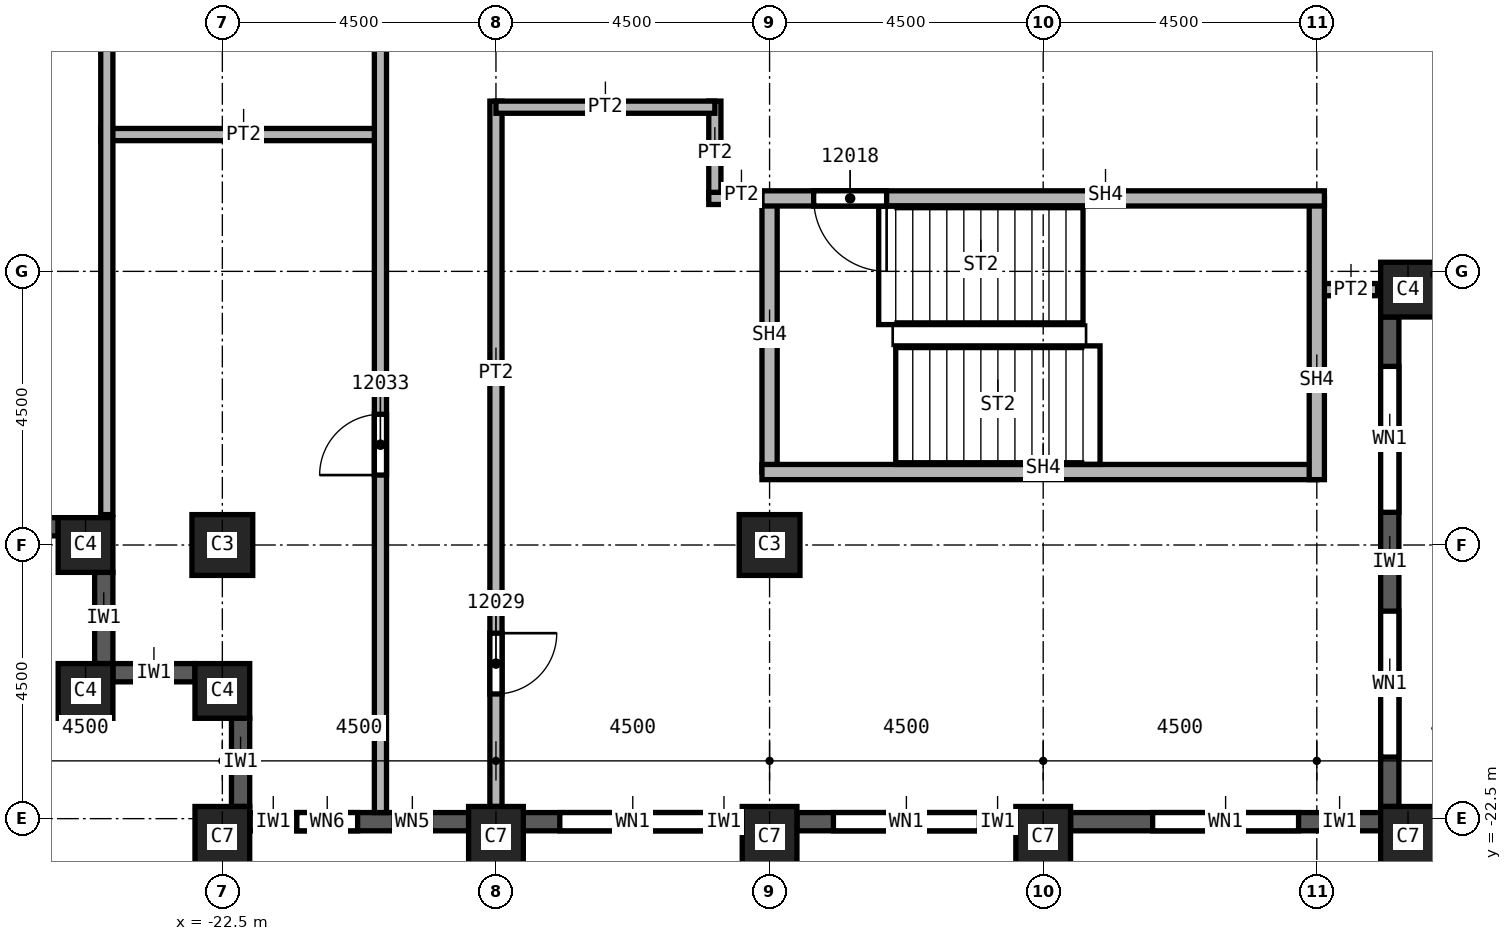
"""IFC4 building model, lengths in metres.
Left out: names, types, materials, properties, quantities, classifications, styles, units other than length and angle.
Written with IfcOpenShell. Run it as: python <this file> out.ifc"""

import sys

from ifc_helpers import new_model, si_unit, direction, frame, frame_2d, origin, origin_2d, place, context, subcontext, project, spatial, rectangle, extrude, element, fill, save


model = new_model("IFC4")
c1 = context("Model", 3, precision=1e-05, world=origin(), true_north=direction((0.0, 1.0)))
c2 = subcontext(c1, "Body", "Model", "MODEL_VIEW")
j1 = project(units=[si_unit("LENGTHUNIT", "METRE"), si_unit("PLANEANGLEUNIT", "RADIAN")], contexts=[c1])
p1 = place(None, origin())
s1 = spatial("IfcSite", under=j1, at=p1, CompositionType="ELEMENT")
p2 = place(p1, origin())
s2 = spatial("IfcBuilding", under=s1, at=p2, CompositionType="ELEMENT")
p3 = place(p2, frame((0.0, 0.0, 196.0)))
s3 = spatial("IfcBuildingStorey", under=s2, at=p3, CompositionType="ELEMENT", Elevation=196.0)
for number, where, z_axis, x_axis in (
    (1, (-13.5, -18.0, 0.0), (0.0, 0.0, 1.0), (1.0, 0.0, 0.0)),
    (2, (-22.5, -18.0, 0.0), (0.0, 0.0, 1.0), (1.0, 0.0, 0.0)),
):
    element("IfcColumn", number, at=place(p3, frame(where, z_axis=z_axis, x_axis=x_axis)), inside=s3, PredefinedType="COLUMN", context=c2, shape_type="SweptSolid", body=[
        extrude(rectangle(XDim=1.0, YDim=1.0, at=origin_2d()), origin(), (0.0, 0.0, 1.0), 3.72),
    ])
for number, where, z_axis, x_axis in (
    (3, (-3.0, -22.8, 0.0), (0.0, 0.0, 1.0), (1.0, 0.0, 0.0)),
    (4, (-9.0, -22.8, 0.0), (0.0, 0.0, 1.0), (1.0, 0.0, 0.0)),
    (5, (-13.5, -22.8, 0.0), (0.0, 0.0, 1.0), (1.0, 0.0, 0.0)),
    (6, (-18.0, -22.8, 0.0), (0.0, 0.0, 1.0), (1.0, 0.0, 0.0)),
    (7, (-22.5, -22.8, 0.0), (0.0, 0.0, 1.0), (1.0, 0.0, 0.0)),
):
    element("IfcColumn", number, at=place(p3, frame(where, z_axis=z_axis, x_axis=x_axis)), inside=s3, PredefinedType="COLUMN", context=c2, shape_type="SweptSolid", body=[
        extrude(rectangle(XDim=0.9, YDim=1.0, at=origin_2d()), origin(), (0.0, 0.0, 1.0), 3.72),
    ])
for number, where, z_axis, x_axis in (
    (8, (-3.0, -13.8, 0.0), (0.0, 0.0, 1.0), (1.0, 0.0, 0.0)),
    (9, (-22.5, -20.4, 0.0), (0.0, 0.0, 1.0), (1.0, 0.0, 0.0)),
    (10, (-24.75, -20.4, 0.0), (0.0, 0.0, 1.0), (1.0, 0.0, 0.0)),
    (11, (-24.75, -18.0, 0.0), (0.0, 0.0, 1.0), (1.0, 0.0, 0.0)),
):
    element("IfcColumn", number, at=place(p3, frame(where, z_axis=z_axis, x_axis=x_axis)), inside=s3, PredefinedType="COLUMN", context=c2, shape_type="SweptSolid", body=[
        extrude(rectangle(XDim=0.9, YDim=0.9, at=origin_2d()), origin(), (0.0, 0.0, 1.0), 3.72),
    ])
p4 = place(p3, frame((-26.55, -17.7, 0.0), z_axis=(0.0, 0.0, 1.0), x_axis=(1.0, 0.0, 0.0)))
e12 = element("IfcWall", 12, at=p4, inside=s3, PredefinedType="SOLIDWALL", context=c2, shape_type="SweptSolid", body=[
    extrude(rectangle(XDim=1.35, YDim=0.3, at=frame_2d((0.675, 0.0))), origin(), (0.0, 0.0, 1.0), 3.12),
])
p5 = place(p3, frame((-24.45, -18.45, 0.0), z_axis=(0.0, 0.0, 1.0), x_axis=(0.0, -1.0, 0.0)))
e13 = element("IfcWall", 13, at=p5, inside=s3, PredefinedType="SOLIDWALL", context=c2, shape_type="SweptSolid", body=[
    extrude(rectangle(XDim=1.5, YDim=0.3, at=frame_2d((0.75, 0.0))), origin(), (0.0, 0.0, 1.0), 3.12),
])
p6 = place(p3, frame((-24.3, -20.1, 0.0), z_axis=(0.0, 0.0, 1.0), x_axis=(1.0, 0.0, 0.0)))
e14 = element("IfcWall", 14, at=p6, inside=s3, PredefinedType="SOLIDWALL", context=c2, shape_type="SweptSolid", body=[
    extrude(rectangle(XDim=1.35, YDim=0.3, at=frame_2d((0.675, 0.0))), origin(), (0.0, 0.0, 1.0), 3.12),
])
p7 = place(p3, frame((-22.2, -20.85, 0.0), z_axis=(0.0, 0.0, 1.0), x_axis=(0.0, -1.0, 0.0)))
e15 = element("IfcWall", 15, at=p7, inside=s3, PredefinedType="SOLIDWALL", context=c2, shape_type="SweptSolid", body=[
    extrude(rectangle(XDim=1.45, YDim=0.3, at=frame_2d((0.725, 0.0))), origin(), (0.0, 0.0, 1.0), 3.12),
])
p8 = place(p3, frame((-22.05, -22.55, 0.0), z_axis=(0.0, 0.0, 1.0), x_axis=(1.0, 0.0, 0.0)))
e16 = element("IfcWall", 16, at=p8, inside=s3, PredefinedType="SOLIDWALL", context=c2, shape_type="SweptSolid", body=[
    extrude(rectangle(XDim=3.6, YDim=0.3, at=frame_2d((1.8, 0.0))), origin(), (0.0, 0.0, 1.0), 3.12),
])
p9 = place(p8, frame((0.775, 0.0, 0.8)))
e17 = element("IfcOpeningElement", 17, at=p9, cuts=e16, PredefinedType="OPENING", context=c2, shape_type="SweptSolid", body=[
    extrude(rectangle(XDim=1.0, YDim=1.95, at=frame_2d((0.5, 0.975))), frame((0.0, 0.15, 0.0), z_axis=(0.0, -1.0, 0.0), x_axis=(1.0, 0.0, 0.0)), (0.0, 0.0, 1.0), 0.3),
])
p10 = place(p8, frame((2.375, 0.0, 0.8)))
e18 = element("IfcOpeningElement", 18, at=p10, cuts=e16, PredefinedType="OPENING", context=c2, shape_type="SweptSolid", body=[
    extrude(rectangle(XDim=0.6, YDim=1.95, at=frame_2d((0.3, 0.975))), frame((0.0, 0.15, 0.0), z_axis=(0.0, -1.0, 0.0), x_axis=(1.0, 0.0, 0.0)), (0.0, 0.0, 1.0), 0.3),
])
p11 = place(p3, frame((-17.55, -22.55, 0.0), z_axis=(0.0, 0.0, 1.0), x_axis=(1.0, 0.0, 0.0)))
e19 = element("IfcWall", 19, at=p11, inside=s3, PredefinedType="SOLIDWALL", context=c2, shape_type="SweptSolid", body=[
    extrude(rectangle(XDim=3.6, YDim=0.3, at=frame_2d((1.8, 0.0))), origin(), (0.0, 0.0, 1.0), 3.12),
])
p12 = place(p11, frame((0.6, 0.0, 0.8)))
e20 = element("IfcOpeningElement", 20, at=p12, cuts=e19, PredefinedType="OPENING", context=c2, shape_type="SweptSolid", body=[
    extrude(rectangle(XDim=2.4, YDim=1.95, at=frame_2d((1.2, 0.975))), frame((0.0, 0.15, 0.0), z_axis=(0.0, -1.0, 0.0), x_axis=(1.0, 0.0, 0.0)), (0.0, 0.0, 1.0), 0.3),
])
p13 = place(p3, frame((-13.05, -22.55, 0.0), z_axis=(0.0, 0.0, 1.0), x_axis=(1.0, 0.0, 0.0)))
e21 = element("IfcWall", 21, at=p13, inside=s3, PredefinedType="SOLIDWALL", context=c2, shape_type="SweptSolid", body=[
    extrude(rectangle(XDim=3.6, YDim=0.3, at=frame_2d((1.8, 0.0))), origin(), (0.0, 0.0, 1.0), 3.12),
])
p14 = place(p13, frame((0.6, 0.0, 0.8)))
e22 = element("IfcOpeningElement", 22, at=p14, cuts=e21, PredefinedType="OPENING", context=c2, shape_type="SweptSolid", body=[
    extrude(rectangle(XDim=2.4, YDim=1.95, at=frame_2d((1.2, 0.975))), frame((0.0, 0.15, 0.0), z_axis=(0.0, -1.0, 0.0), x_axis=(1.0, 0.0, 0.0)), (0.0, 0.0, 1.0), 0.3),
])
p15 = place(p3, frame((-8.55, -22.55, 0.0), z_axis=(0.0, 0.0, 1.0), x_axis=(1.0, 0.0, 0.0)))
e23 = element("IfcWall", 23, at=p15, inside=s3, PredefinedType="SOLIDWALL", context=c2, shape_type="SweptSolid", body=[
    extrude(rectangle(XDim=5.1, YDim=0.3, at=frame_2d((2.55, 0.0))), origin(), (0.0, 0.0, 1.0), 3.12),
])
p16 = place(p15, frame((1.35, 0.0, 0.8)))
e24 = element("IfcOpeningElement", 24, at=p16, cuts=e23, PredefinedType="OPENING", context=c2, shape_type="SweptSolid", body=[
    extrude(rectangle(XDim=2.4, YDim=1.95, at=frame_2d((1.2, 0.975))), frame((0.0, 0.15, 0.0), z_axis=(0.0, -1.0, 0.0), x_axis=(1.0, 0.0, 0.0)), (0.0, 0.0, 1.0), 0.3),
])
p17 = place(p3, frame((-3.3, -22.3, 0.0), z_axis=(0.0, 0.0, 1.0), x_axis=(0.0, 1.0, 0.0)))
e25 = element("IfcWall", 25, at=p17, inside=s3, PredefinedType="SOLIDWALL", context=c2, shape_type="SweptSolid", body=[
    extrude(rectangle(XDim=8.05, YDim=0.3, at=frame_2d((4.025, 0.0))), origin(), (0.0, 0.0, 1.0), 3.12),
])
p18 = place(p17, frame((0.812, 0.0, 0.8)))
e26 = element("IfcOpeningElement", 26, at=p18, cuts=e25, PredefinedType="OPENING", context=c2, shape_type="SweptSolid", body=[
    extrude(rectangle(XDim=2.4, YDim=1.95, at=frame_2d((1.2, 0.975))), frame((0.0, 0.15, 0.0), z_axis=(0.0, -1.0, 0.0), x_axis=(1.0, 0.0, 0.0)), (0.0, 0.0, 1.0), 0.3),
])
p19 = place(p17, frame((4.837, 0.0, 0.8)))
e27 = element("IfcOpeningElement", 27, at=p19, cuts=e25, PredefinedType="OPENING", context=c2, shape_type="SweptSolid", body=[
    extrude(rectangle(XDim=2.4, YDim=1.95, at=frame_2d((1.2, 0.975))), frame((0.0, 0.15, 0.0), z_axis=(0.0, -1.0, 0.0), x_axis=(1.0, 0.0, 0.0)), (0.0, 0.0, 1.0), 0.3),
])
p20 = place(p3, frame((-24.5, -11.25, 0.0), z_axis=(0.0, 0.0, 1.0), x_axis=(1.0, 0.0, 0.0)))
e28 = element("IfcWall", 28, at=p20, inside=s3, PredefinedType="PARTITIONING", context=c2, shape_type="SweptSolid", body=[
    extrude(rectangle(XDim=4.6, YDim=0.2, at=frame_2d((2.3, 0.0))), origin(), (0.0, 0.0, 1.0), 3.72),
])
p21 = place(p3, frame((-24.4, -17.5, 0.0), z_axis=(0.0, 0.0, 1.0), x_axis=(0.0, 1.0, 0.0)))
e29 = element("IfcWall", 29, at=p21, inside=s3, PredefinedType="PARTITIONING", context=c2, shape_type="SweptSolid", body=[
    extrude(rectangle(XDim=18.25, YDim=0.2, at=frame_2d((9.125, 0.0))), origin(), (0.0, 0.0, 1.0), 3.72),
])
p22 = place(p21, frame((14.45, 0.0, 0.0)))
e30 = element("IfcOpeningElement", 30, at=p22, cuts=e29, PredefinedType="OPENING", context=c2, shape_type="SweptSolid", body=[
    extrude(rectangle(XDim=1.0, YDim=2.1, at=frame_2d((0.5, 1.05))), frame((0.0, 0.1, 0.0), z_axis=(0.0, -1.0, 0.0), x_axis=(1.0, 0.0, 0.0)), (0.0, 0.0, 1.0), 0.2),
])
p23 = place(p3, frame((-19.9, -22.4, 0.0), z_axis=(0.0, 0.0, 1.0), x_axis=(0.0, 1.0, 0.0)))
e31 = element("IfcWall", 31, at=p23, inside=s3, PredefinedType="PARTITIONING", context=c2, shape_type="SweptSolid", body=[
    extrude(rectangle(XDim=23.25, YDim=0.2, at=frame_2d((11.625, 0.0))), origin(), (0.0, 0.0, 1.0), 3.72),
])
p24 = place(p23, frame((5.55, 0.0, 0.0)))
e32 = element("IfcOpeningElement", 32, at=p24, cuts=e31, PredefinedType="OPENING", context=c2, shape_type="SweptSolid", body=[
    extrude(rectangle(XDim=1.0, YDim=2.1, at=frame_2d((0.5, 1.05))), frame((0.0, 0.1, 0.0), z_axis=(0.0, -1.0, 0.0), x_axis=(1.0, 0.0, 0.0)), (0.0, 0.0, 1.0), 0.2),
])
p25 = place(p23, frame((14.0, 0.0, 0.0)))
e33 = element("IfcOpeningElement", 33, at=p25, cuts=e31, PredefinedType="OPENING", context=c2, shape_type="SweptSolid", body=[
    extrude(rectangle(XDim=1.0, YDim=2.1, at=frame_2d((0.5, 1.05))), frame((0.0, 0.1, 0.0), z_axis=(0.0, -1.0, 0.0), x_axis=(1.0, 0.0, 0.0)), (0.0, 0.0, 1.0), 0.2),
])
p26 = place(p3, frame((-18.0, -10.7, 0.0), z_axis=(0.0, 0.0, 1.0), x_axis=(0.0, -1.0, 0.0)))
e34 = element("IfcWall", 34, at=p26, inside=s3, PredefinedType="PARTITIONING", context=c2, shape_type="SweptSolid", body=[
    extrude(rectangle(XDim=11.6, YDim=0.2, at=frame_2d((5.8, 0.0))), origin(), (0.0, 0.0, 1.0), 3.72),
])
p27 = place(p26, frame((8.75, 0.0, 0.0)))
e35 = element("IfcOpeningElement", 35, at=p27, cuts=e34, PredefinedType="OPENING", context=c2, shape_type="SweptSolid", body=[
    extrude(rectangle(XDim=1.0, YDim=2.1, at=frame_2d((0.5, 1.05))), frame((0.0, 0.1, 0.0), z_axis=(0.0, -1.0, 0.0), x_axis=(1.0, 0.0, 0.0)), (0.0, 0.0, 1.0), 0.2),
])
p28 = place(p3, frame((-14.4, -12.3, 0.0), z_axis=(0.0, 0.0, 1.0), x_axis=(0.0, 1.0, 0.0)))
e36 = element("IfcWall", 36, at=p28, inside=s3, PredefinedType="PARTITIONING", context=c2, shape_type="SweptSolid", body=[
    extrude(rectangle(XDim=1.6, YDim=0.2, at=frame_2d((0.8, 0.0))), origin(), (0.0, 0.0, 1.0), 3.72),
])
p29 = place(p3, frame((-14.4, -10.8, 0.0), z_axis=(0.0, 0.0, 1.0), x_axis=(-1.0, 0.0, 0.0)))
e37 = element("IfcWall", 37, at=p29, inside=s3, PredefinedType="PARTITIONING", context=c2, shape_type="SweptSolid", body=[
    extrude(rectangle(XDim=3.6, YDim=0.2, at=frame_2d((1.8, 0.0))), origin(), (0.0, 0.0, 1.0), 3.72),
])
p30 = place(p3, frame((-13.375, -12.3, 0.0), z_axis=(0.0, 0.0, 1.0), x_axis=(-1.0, 0.0, 0.0)))
e38 = element("IfcWall", 38, at=p30, inside=s3, PredefinedType="PARTITIONING", context=c2, shape_type="SweptSolid", body=[
    extrude(rectangle(XDim=1.125, YDim=0.2, at=frame_2d((0.562, 0.0))), origin(), (0.0, 0.0, 1.0), 3.72),
])
p31 = place(p3, frame((-3.5, -13.8, 0.0), z_axis=(0.0, 0.0, 1.0), x_axis=(-1.0, 0.0, 0.0)))
e39 = element("IfcWall", 39, at=p31, inside=s3, PredefinedType="PARTITIONING", context=c2, shape_type="SweptSolid", body=[
    extrude(rectangle(XDim=1.0, YDim=0.2, at=frame_2d((0.5, 0.0))), origin(), (0.0, 0.0, 1.0), 3.72),
])
p32 = place(p3, frame((-13.5, -16.8, 0.0), z_axis=(0.0, 0.0, 1.0), x_axis=(0.0, 1.0, 0.0)))
e40 = element("IfcWall", 40, at=p32, inside=s3, PredefinedType="SOLIDWALL", context=c2, shape_type="SweptSolid", body=[
    extrude(rectangle(XDim=4.5, YDim=0.25, at=frame_2d((2.25, 0.0))), origin(), (0.0, 0.0, 1.0), 3.72),
])
p33 = place(p3, frame((-4.5, -16.8, 0.0), z_axis=(0.0, 0.0, 1.0), x_axis=(-1.0, 0.0, 0.0)))
e41 = element("IfcWall", 41, at=p33, inside=s3, PredefinedType="SOLIDWALL", context=c2, shape_type="SweptSolid", body=[
    extrude(rectangle(XDim=9.125, YDim=0.25, at=frame_2d((4.562, 0.0))), origin(), (0.0, 0.0, 1.0), 3.72),
])
p34 = place(p3, frame((-4.5, -12.3, 0.0), z_axis=(0.0, 0.0, 1.0), x_axis=(0.0, -1.0, 0.0)))
e42 = element("IfcWall", 42, at=p34, inside=s3, PredefinedType="SOLIDWALL", context=c2, shape_type="SweptSolid", body=[
    extrude(rectangle(XDim=4.625, YDim=0.25, at=frame_2d((2.312, 0.0))), origin(), (0.0, 0.0, 1.0), 3.72),
])
p35 = place(p3, frame((-4.375, -12.3, 0.0), z_axis=(0.0, 0.0, 1.0), x_axis=(-1.0, 0.0, 0.0)))
e43 = element("IfcWall", 43, at=p35, inside=s3, PredefinedType="SOLIDWALL", context=c2, shape_type="SweptSolid", body=[
    extrude(rectangle(XDim=9.25, YDim=0.25, at=frame_2d((4.625, 0.0))), origin(), (0.0, 0.0, 1.0), 3.72),
])
p36 = place(p35, frame((7.2, 0.0, 0.0)))
e44 = element("IfcOpeningElement", 44, at=p36, cuts=e43, PredefinedType="OPENING", context=c2, shape_type="SweptSolid", body=[
    extrude(rectangle(XDim=1.2, YDim=2.1, at=frame_2d((0.6, 1.05))), frame((0.0, 0.125, 0.0), z_axis=(0.0, -1.0, 0.0), x_axis=(1.0, 0.0, 0.0)), (0.0, 0.0, 1.0), 0.25),
])
p37 = place(p12, origin())
e45 = element("IfcWindow", 45, at=p37, inside=s3, PartitioningType="SINGLE_PANEL", PredefinedType="WINDOW", context=c2, shape_type="SweptSolid", body=[
    extrude(rectangle(XDim=2.4, YDim=1.95, at=frame_2d((1.2, 0.975))), frame((0.0, 0.03, 0.0), z_axis=(0.0, -1.0, 0.0), x_axis=(1.0, 0.0, 0.0)), (0.0, 0.0, 1.0), 0.06),
])
fill(e20, e45)
p38 = place(p14, origin())
e46 = element("IfcWindow", 46, at=p38, inside=s3, PartitioningType="SINGLE_PANEL", PredefinedType="WINDOW", context=c2, shape_type="SweptSolid", body=[
    extrude(rectangle(XDim=2.4, YDim=1.95, at=frame_2d((1.2, 0.975))), frame((0.0, 0.03, 0.0), z_axis=(0.0, -1.0, 0.0), x_axis=(1.0, 0.0, 0.0)), (0.0, 0.0, 1.0), 0.06),
])
fill(e22, e46)
p39 = place(p16, origin())
e47 = element("IfcWindow", 47, at=p39, inside=s3, PartitioningType="SINGLE_PANEL", PredefinedType="WINDOW", context=c2, shape_type="SweptSolid", body=[
    extrude(rectangle(XDim=2.4, YDim=1.95, at=frame_2d((1.2, 0.975))), frame((0.0, 0.03, 0.0), z_axis=(0.0, -1.0, 0.0), x_axis=(1.0, 0.0, 0.0)), (0.0, 0.0, 1.0), 0.06),
])
fill(e24, e47)
p40 = place(p18, origin())
e48 = element("IfcWindow", 48, at=p40, inside=s3, PartitioningType="SINGLE_PANEL", PredefinedType="WINDOW", context=c2, shape_type="SweptSolid", body=[
    extrude(rectangle(XDim=2.4, YDim=1.95, at=frame_2d((1.2, 0.975))), frame((0.0, 0.03, 0.0), z_axis=(0.0, -1.0, 0.0), x_axis=(1.0, 0.0, 0.0)), (0.0, 0.0, 1.0), 0.06),
])
fill(e26, e48)
p41 = place(p19, origin())
e49 = element("IfcWindow", 49, at=p41, inside=s3, PartitioningType="SINGLE_PANEL", PredefinedType="WINDOW", context=c2, shape_type="SweptSolid", body=[
    extrude(rectangle(XDim=2.4, YDim=1.95, at=frame_2d((1.2, 0.975))), frame((0.0, 0.03, 0.0), z_axis=(0.0, -1.0, 0.0), x_axis=(1.0, 0.0, 0.0)), (0.0, 0.0, 1.0), 0.06),
])
fill(e27, e49)
p42 = place(p36, origin())
e50 = element("IfcDoor", 50, at=p42, inside=s3, OperationType="SINGLE_SWING_LEFT", PredefinedType="DOOR", context=c2, shape_type="SweptSolid", body=[
    extrude(rectangle(XDim=1.2, YDim=2.1, at=frame_2d((0.6, 1.05))), frame((0.0, 0.025, 0.0), z_axis=(0.0, -1.0, 0.0), x_axis=(1.0, 0.0, 0.0)), (0.0, 0.0, 1.0), 0.05),
])
fill(e44, e50)
p43 = place(p27, origin())
e51 = element("IfcDoor", 51, at=p43, inside=s3, OperationType="SINGLE_SWING_RIGHT", PredefinedType="DOOR", context=c2, shape_type="SweptSolid", body=[
    extrude(rectangle(XDim=1.0, YDim=2.1, at=frame_2d((0.5, 1.05))), frame((0.0, 0.025, 0.0), z_axis=(0.0, -1.0, 0.0), x_axis=(1.0, 0.0, 0.0)), (0.0, 0.0, 1.0), 0.05),
])
fill(e35, e51)
p44 = place(p24, origin())
e52 = element("IfcDoor", 52, at=p44, inside=s3, OperationType="SINGLE_SWING_RIGHT", PredefinedType="DOOR", context=c2, shape_type="SweptSolid", body=[
    extrude(rectangle(XDim=1.0, YDim=2.1, at=frame_2d((0.5, 1.05))), frame((0.0, 0.025, 0.0), z_axis=(0.0, -1.0, 0.0), x_axis=(1.0, 0.0, 0.0)), (0.0, 0.0, 1.0), 0.05),
])
fill(e32, e52)
p45 = place(p9, origin())
e53 = element("IfcWindow", 53, at=p45, inside=s3, PartitioningType="SINGLE_PANEL", PredefinedType="WINDOW", context=c2, shape_type="SweptSolid", body=[
    extrude(rectangle(XDim=1.0, YDim=1.95, at=frame_2d((0.5, 0.975))), frame((0.0, 0.03, 0.0), z_axis=(0.0, -1.0, 0.0), x_axis=(1.0, 0.0, 0.0)), (0.0, 0.0, 1.0), 0.06),
])
fill(e17, e53)
p46 = place(p10, origin())
e54 = element("IfcWindow", 54, at=p46, inside=s3, PartitioningType="SINGLE_PANEL", PredefinedType="WINDOW", context=c2, shape_type="SweptSolid", body=[
    extrude(rectangle(XDim=0.6, YDim=1.95, at=frame_2d((0.3, 0.975))), frame((0.0, 0.03, 0.0), z_axis=(0.0, -1.0, 0.0), x_axis=(1.0, 0.0, 0.0)), (0.0, 0.0, 1.0), 0.06),
])
fill(e18, e54)
save(model, sys.argv[1])
